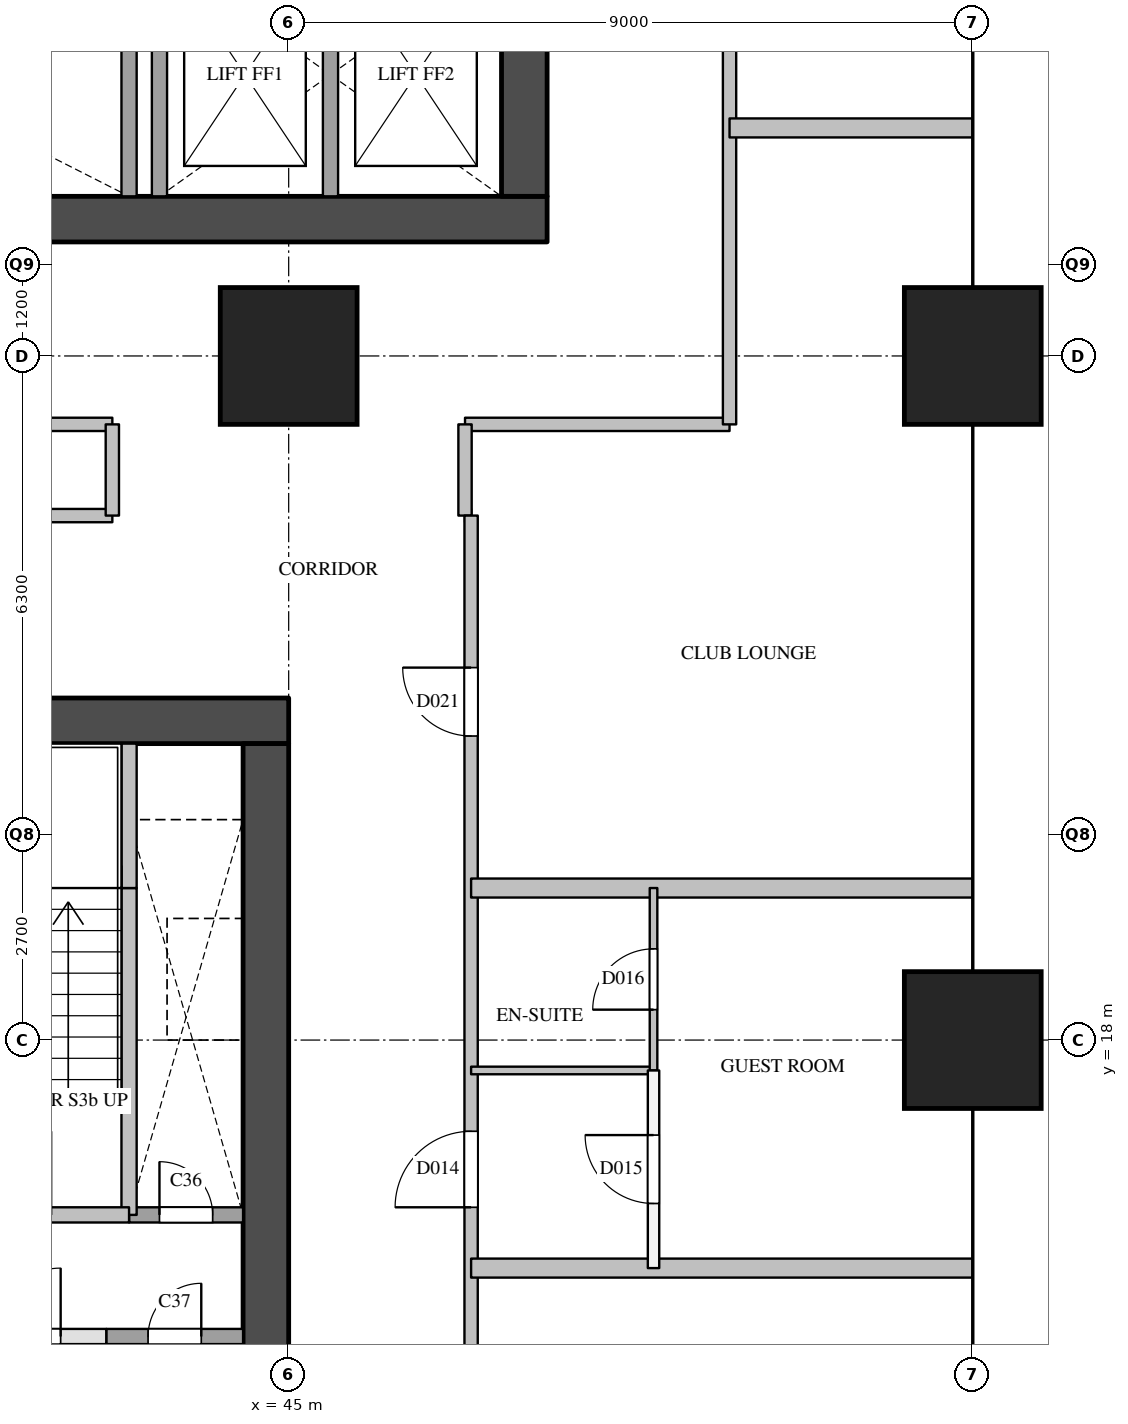
"""IFC4 building model, lengths in metres.
Left out: names, types, materials, properties, quantities, classifications, styles, units other than length and angle.
Written with IfcOpenShell. Run it as: python <this file> out.ifc"""

import sys

from ifc_helpers import new_model, si_unit, direction, frame, frame_2d, origin, origin_2d, place, context, subcontext, project, spatial, rectangle, extrude, element, fill, save


model = new_model("IFC4")
c1 = context("Model", 3, precision=1e-05, world=origin(), true_north=direction((0.0, 1.0)))
c2 = subcontext(c1, "Body", "Model", "MODEL_VIEW")
j1 = project(units=[si_unit("LENGTHUNIT", "METRE"), si_unit("PLANEANGLEUNIT", "RADIAN")], contexts=[c1])
p1 = place(None, origin())
s1 = spatial("IfcSite", under=j1, at=p1, CompositionType="ELEMENT")
p2 = place(p1, origin())
s2 = spatial("IfcBuilding", under=s1, at=p2, CompositionType="ELEMENT")
p3 = place(p2, frame((0.0, 0.0, 50.0)))
s3 = spatial("IfcBuildingStorey", under=s2, at=p3, CompositionType="ELEMENT", Elevation=50.0)
for number, where, z_axis, x_axis in (
    (1, (45.0, 27.0, 0.0), (0.0, 0.0, 1.0), (1.0, 0.0, 0.0)),
    (2, (54.0, 18.0, 0.0), (0.0, 0.0, 1.0), (1.0, 0.0, 0.0)),
    (3, (54.0, 27.0, 0.0), (0.0, 0.0, 1.0), (1.0, 0.0, 0.0)),
):
    element("IfcColumn", number, at=place(p3, frame(where, z_axis=z_axis, x_axis=x_axis)), inside=s3, PredefinedType="COLUMN", context=c2, shape_type="SweptSolid", body=[
        extrude(rectangle(XDim=1.8, YDim=1.8, at=origin_2d()), origin(), (0.0, 0.0, 1.0), 3.8),
    ])
p4 = place(p3, frame((36.0, 28.8, 0.0), z_axis=(0.0, 0.0, 1.0), x_axis=(1.0, 0.0, 0.0)))
e4 = element("IfcWall", 4, at=p4, inside=s3, PredefinedType="SHEAR", context=c2, shape_type="SweptSolid", body=[
    extrude(rectangle(XDim=12.4, YDim=0.6, at=frame_2d((6.2, 0.0))), origin(), (0.0, 0.0, 1.0), 3.5),
])
p5 = place(p3, frame((48.1, 29.1, 0.0), z_axis=(0.0, 0.0, 1.0), x_axis=(0.0, 1.0, 0.0)))
e5 = element("IfcWall", 5, at=p5, inside=s3, PredefinedType="SHEAR", context=c2, shape_type="SweptSolid", body=[
    extrude(rectangle(XDim=20.3, YDim=0.6, at=frame_2d((10.15, 0.0))), origin(), (0.0, 0.0, 1.0), 3.5),
])
p6 = place(p5, frame((12.5, 0.0, 0.0)))
e6 = element("IfcOpeningElement", 6, at=p6, cuts=e5, PredefinedType="OPENING", context=c2, shape_type="SweptSolid", body=[
    extrude(rectangle(XDim=0.7, YDim=2.1, at=frame_2d((0.35, 1.05))), frame((0.0, 0.31, 0.0), z_axis=(0.0, -1.0, 0.0), x_axis=(1.0, 0.0, 0.0)), (0.0, 0.0, 1.0), 0.62),
])
p7 = place(p5, frame((3.9, 0.0, 0.0)))
e7 = element("IfcOpeningElement", 7, at=p7, cuts=e5, PredefinedType="OPENING", context=c2, shape_type="SweptSolid", body=[
    extrude(rectangle(XDim=1.8, YDim=2.1, at=frame_2d((0.9, 1.05))), frame((0.0, 0.31, 0.0), z_axis=(0.0, -1.0, 0.0), x_axis=(1.0, 0.0, 0.0)), (0.0, 0.0, 1.0), 0.62),
])
p8 = place(p3, frame((42.9, 29.1, 0.0), z_axis=(0.0, 0.0, 1.0), x_axis=(0.0, 1.0, 0.0)))
e8 = element("IfcWall", 8, at=p8, inside=s3, PredefinedType="SOLIDWALL", context=c2, shape_type="SweptSolid", body=[
    extrude(rectangle(XDim=3.2, YDim=0.2, at=frame_2d((1.6, 0.0))), origin(), (0.0, 0.0, 1.0), 3.5),
])
p9 = place(p3, frame((43.3, 29.1, 0.0), z_axis=(0.0, 0.0, 1.0), x_axis=(0.0, 1.0, 0.0)))
e9 = element("IfcWall", 9, at=p9, inside=s3, PredefinedType="SOLIDWALL", context=c2, shape_type="SweptSolid", body=[
    extrude(rectangle(XDim=9.9, YDim=0.2, at=frame_2d((4.95, 0.0))), origin(), (0.0, 0.0, 1.0), 3.5),
])
p10 = place(p3, frame((45.55, 29.1, 0.0), z_axis=(0.0, 0.0, 1.0), x_axis=(0.0, 1.0, 0.0)))
e10 = element("IfcWall", 10, at=p10, inside=s3, PredefinedType="SOLIDWALL", context=c2, shape_type="SweptSolid", body=[
    extrude(rectangle(XDim=3.2, YDim=0.2, at=frame_2d((1.6, 0.0))), origin(), (0.0, 0.0, 1.0), 3.5),
])
p11 = place(p3, frame((36.0, 22.2, 0.0), z_axis=(0.0, 0.0, 1.0), x_axis=(1.0, 0.0, 0.0)))
e11 = element("IfcWall", 11, at=p11, inside=s3, PredefinedType="SHEAR", context=c2, shape_type="SweptSolid", body=[
    extrude(rectangle(XDim=9.0, YDim=0.6, at=frame_2d((4.5, 0.0))), origin(), (0.0, 0.0, 1.0), 3.5),
])
p12 = place(p3, frame((44.7, 9.6, 0.0), z_axis=(0.0, 0.0, 1.0), x_axis=(0.0, 1.0, 0.0)))
e12 = element("IfcWall", 12, at=p12, inside=s3, PredefinedType="SHEAR", context=c2, shape_type="SweptSolid", body=[
    extrude(rectangle(XDim=12.3, YDim=0.6, at=frame_2d((6.15, 0.0))), origin(), (0.0, 0.0, 1.0), 3.5),
])
p13 = place(p12, frame((0.8, 0.0, 0.0)))
e13 = element("IfcOpeningElement", 13, at=p13, cuts=e12, PredefinedType="OPENING", context=c2, shape_type="SweptSolid", body=[
    extrude(rectangle(XDim=0.7, YDim=2.1, at=frame_2d((0.35, 1.05))), frame((0.0, 0.31, 0.0), z_axis=(0.0, -1.0, 0.0), x_axis=(1.0, 0.0, 0.0)), (0.0, 0.0, 1.0), 0.62),
])
p14 = place(p3, frame((42.6, 11.9, 0.0), z_axis=(0.0, 0.0, 1.0), x_axis=(0.0, 1.0, 0.0)))
e14 = element("IfcWall", 14, at=p14, inside=s3, PredefinedType="SOLIDWALL", context=c2, shape_type="SweptSolid", body=[
    extrude(rectangle(XDim=2.2, YDim=0.2, at=frame_2d((1.1, 0.0))), origin(), (0.0, 0.0, 1.0), 3.5),
])
p15 = place(p3, frame((42.9, 15.7, 0.0), z_axis=(0.0, 0.0, 1.0), x_axis=(0.0, 1.0, 0.0)))
e15 = element("IfcWall", 15, at=p15, inside=s3, PredefinedType="SOLIDWALL", context=c2, shape_type="SweptSolid", body=[
    extrude(rectangle(XDim=4.3, YDim=0.2, at=frame_2d((2.15, 0.0))), origin(), (0.0, 0.0, 1.0), 3.5),
])
p16 = place(p3, frame((42.9, 20.0, 0.0), z_axis=(0.0, 0.0, 1.0), x_axis=(0.0, 1.0, 0.0)))
e16 = element("IfcWall", 16, at=p16, inside=s3, PredefinedType="SOLIDWALL", context=c2, shape_type="SweptSolid", body=[
    extrude(rectangle(XDim=1.9, YDim=0.2, at=frame_2d((0.95, 0.0))), origin(), (0.0, 0.0, 1.0), 3.5),
])
p17 = place(p3, frame((36.6, 14.1, 0.0), z_axis=(0.0, 0.0, 1.0), x_axis=(1.0, 0.0, 0.0)))
e17 = element("IfcWall", 17, at=p17, inside=s3, PredefinedType="PARTITIONING", context=c2, shape_type="SweptSolid", body=[
    extrude(rectangle(XDim=6.0, YDim=0.2, at=frame_2d((3.0, 0.0))), origin(), (0.0, 0.0, 1.0), 3.5),
])
p18 = place(p17, frame((1.5, 0.0, 0.0)))
e18 = element("IfcOpeningElement", 18, at=p18, cuts=e17, PredefinedType="OPENING", context=c2, shape_type="SweptSolid", body=[
    extrude(rectangle(XDim=0.9, YDim=2.1, at=frame_2d((0.45, 1.05))), frame((0.0, 0.11, 0.0), z_axis=(0.0, -1.0, 0.0), x_axis=(1.0, 0.0, 0.0)), (0.0, 0.0, 1.0), 0.22),
])
p19 = place(p17, frame((4.5, 0.0, 0.0)))
e19 = element("IfcOpeningElement", 19, at=p19, cuts=e17, PredefinedType="OPENING", context=c2, shape_type="SweptSolid", body=[
    extrude(rectangle(XDim=0.9, YDim=2.1, at=frame_2d((0.45, 1.05))), frame((0.0, 0.11, 0.0), z_axis=(0.0, -1.0, 0.0), x_axis=(1.0, 0.0, 0.0)), (0.0, 0.0, 1.0), 0.22),
])
p20 = place(p3, frame((42.6, 14.1, 0.0), z_axis=(0.0, 0.0, 1.0), x_axis=(1.0, 0.0, 0.0)))
e20 = element("IfcWall", 20, at=p20, inside=s3, PredefinedType="SOLIDWALL", context=c2, shape_type="SweptSolid", body=[
    extrude(rectangle(XDim=1.8, YDim=0.2, at=frame_2d((0.9, 0.0))), origin(), (0.0, 0.0, 1.0), 3.5),
])
p21 = place(p20, frame((0.55, 0.0, 0.0)))
e21 = element("IfcOpeningElement", 21, at=p21, cuts=e20, PredefinedType="OPENING", context=c2, shape_type="SweptSolid", body=[
    extrude(rectangle(XDim=0.7, YDim=2.1, at=frame_2d((0.35, 1.05))), frame((0.0, 0.11, 0.0), z_axis=(0.0, -1.0, 0.0), x_axis=(1.0, 0.0, 0.0)), (0.0, 0.0, 1.0), 0.22),
])
p22 = place(p3, frame((42.9, 15.7, 0.0), z_axis=(0.0, 0.0, 1.0), x_axis=(1.0, 0.0, 0.0)))
e22 = element("IfcWall", 22, at=p22, inside=s3, PredefinedType="SOLIDWALL", context=c2, shape_type="SweptSolid", body=[
    extrude(rectangle(XDim=1.5, YDim=0.2, at=frame_2d((0.75, 0.0))), origin(), (0.0, 0.0, 1.0), 3.5),
])
p23 = place(p22, frame((0.4, 0.0, 0.0)))
e23 = element("IfcOpeningElement", 23, at=p23, cuts=e22, PredefinedType="OPENING", context=c2, shape_type="SweptSolid", body=[
    extrude(rectangle(XDim=0.7, YDim=2.1, at=frame_2d((0.35, 1.05))), frame((0.0, 0.11, 0.0), z_axis=(0.0, -1.0, 0.0), x_axis=(1.0, 0.0, 0.0)), (0.0, 0.0, 1.0), 0.22),
])
p24 = place(p3, frame((36.6, 15.7, 0.0), z_axis=(0.0, 0.0, 1.0), x_axis=(1.0, 0.0, 0.0)))
e24 = element("IfcWall", 24, at=p24, inside=s3, PredefinedType="SOLIDWALL", context=c2, shape_type="SweptSolid", body=[
    extrude(rectangle(XDim=6.3, YDim=0.2, at=frame_2d((3.15, 0.0))), origin(), (0.0, 0.0, 1.0), 3.5),
])
p25 = place(p24, frame((1.025, 0.0, 0.0)))
e25 = element("IfcOpeningElement", 25, at=p25, cuts=e24, PredefinedType="OPENING", context=c2, shape_type="SweptSolid", body=[
    extrude(rectangle(XDim=1.1, YDim=2.1, at=frame_2d((0.55, 1.05))), frame((0.0, 0.11, 0.0), z_axis=(0.0, -1.0, 0.0), x_axis=(1.0, 0.0, 0.0)), (0.0, 0.0, 1.0), 0.22),
])
p26 = place(p24, frame((4.175, 0.0, 0.0)))
e26 = element("IfcOpeningElement", 26, at=p26, cuts=e24, PredefinedType="OPENING", context=c2, shape_type="SweptSolid", body=[
    extrude(rectangle(XDim=1.1, YDim=2.1, at=frame_2d((0.55, 1.05))), frame((0.0, 0.11, 0.0), z_axis=(0.0, -1.0, 0.0), x_axis=(1.0, 0.0, 0.0)), (0.0, 0.0, 1.0), 0.22),
])
p27 = place(p3, frame((38.32, 24.9, 0.0), z_axis=(0.0, 0.0, 1.0), x_axis=(1.0, 0.0, 0.0)))
e27 = element("IfcWall", 27, at=p27, inside=s3, PredefinedType="PARTITIONING", context=c2, shape_type="SweptSolid", body=[
    extrude(rectangle(XDim=4.36, YDim=0.175, at=frame_2d((2.18, 0.0))), origin(), (0.0, 0.0, 1.0), 3.5),
])
p28 = place(p27, frame((1.68, 0.0, 0.0)))
e28 = element("IfcOpeningElement", 28, at=p28, cuts=e27, PredefinedType="OPENING", context=c2, shape_type="SweptSolid", body=[
    extrude(rectangle(XDim=1.0, YDim=2.1, at=frame_2d((0.5, 1.05))), frame((0.0, 0.097, 0.0), z_axis=(0.0, -1.0, 0.0), x_axis=(1.0, 0.0, 0.0)), (0.0, 0.0, 1.0), 0.195),
])
p29 = place(p3, frame((47.32, 24.9, 0.0), z_axis=(0.0, 0.0, 1.0), x_axis=(1.0, 0.0, 0.0)))
e29 = element("IfcWall", 29, at=p29, inside=s3, PredefinedType="PARTITIONING", context=c2, shape_type="SweptSolid", body=[
    extrude(rectangle(XDim=0.08, YDim=0.175, at=frame_2d((0.04, 0.0))), origin(), (0.0, 0.0, 1.0), 3.5),
])
p30 = place(p3, frame((38.32, 26.1, 0.0), z_axis=(0.0, 0.0, 1.0), x_axis=(1.0, 0.0, 0.0)))
e30 = element("IfcWall", 30, at=p30, inside=s3, PredefinedType="PARTITIONING", context=c2, shape_type="SweptSolid", body=[
    extrude(rectangle(XDim=4.36, YDim=0.175, at=frame_2d((2.18, 0.0))), origin(), (0.0, 0.0, 1.0), 3.5),
])
p31 = place(p3, frame((47.32, 26.1, 0.0), z_axis=(0.0, 0.0, 1.0), x_axis=(1.0, 0.0, 0.0)))
e31 = element("IfcWall", 31, at=p31, inside=s3, PredefinedType="PARTITIONING", context=c2, shape_type="SweptSolid", body=[
    extrude(rectangle(XDim=3.48, YDim=0.175, at=frame_2d((1.74, 0.0))), origin(), (0.0, 0.0, 1.0), 3.5),
])
for number, where, z_axis, x_axis in (
    (32, (42.68, 24.9, 0.0), (0.0, 0.0, 1.0), (0.0, 1.0, 0.0)),
    (33, (47.32, 24.9, 0.0), (0.0, 0.0, 1.0), (0.0, 1.0, 0.0)),
):
    element("IfcWall", number, at=place(p3, frame(where, z_axis=z_axis, x_axis=x_axis)), inside=s3, PredefinedType="PARTITIONING", context=c2, shape_type="SweptSolid", body=[
        extrude(rectangle(XDim=1.2, YDim=0.175, at=frame_2d((0.6, 0.0))), origin(), (0.0, 0.0, 1.0), 3.5),
    ])
p32 = place(p3, frame((47.4, 6.6, 0.0), z_axis=(0.0, 0.0, 1.0), x_axis=(0.0, 1.0, 0.0)))
e34 = element("IfcWall", 34, at=p32, inside=s3, PredefinedType="PARTITIONING", context=c2, shape_type="SweptSolid", body=[
    extrude(rectangle(XDim=18.3, YDim=0.175, at=frame_2d((9.15, 0.0))), origin(), (0.0, 0.0, 1.0), 3.5),
])
p33 = place(p32, frame((3.75, 0.0, 0.0)))
e35 = element("IfcOpeningElement", 35, at=p33, cuts=e34, PredefinedType="OPENING", context=c2, shape_type="SweptSolid", body=[
    extrude(rectangle(XDim=0.9, YDim=2.1, at=frame_2d((0.45, 1.05))), frame((0.0, 0.097, 0.0), z_axis=(0.0, -1.0, 0.0), x_axis=(1.0, 0.0, 0.0)), (0.0, 0.0, 1.0), 0.195),
])
p34 = place(p32, frame((9.2, 0.0, 0.0)))
e36 = element("IfcOpeningElement", 36, at=p34, cuts=e34, PredefinedType="OPENING", context=c2, shape_type="SweptSolid", body=[
    extrude(rectangle(XDim=1.0, YDim=2.1, at=frame_2d((0.5, 1.05))), frame((0.0, 0.097, 0.0), z_axis=(0.0, -1.0, 0.0), x_axis=(1.0, 0.0, 0.0)), (0.0, 0.0, 1.0), 0.195),
])
p35 = place(p32, frame((15.4, 0.0, 0.0)))
e37 = element("IfcOpeningElement", 37, at=p35, cuts=e34, PredefinedType="OPENING", context=c2, shape_type="SweptSolid", body=[
    extrude(rectangle(XDim=0.9, YDim=2.1, at=frame_2d((0.45, 1.05))), frame((0.0, 0.097, 0.0), z_axis=(0.0, -1.0, 0.0), x_axis=(1.0, 0.0, 0.0)), (0.0, 0.0, 1.0), 0.195),
])
p36 = place(p3, frame((50.8, 26.1, 0.0), z_axis=(0.0, 0.0, 1.0), x_axis=(0.0, 1.0, 0.0)))
e38 = element("IfcWall", 38, at=p36, inside=s3, PredefinedType="PARTITIONING", context=c2, shape_type="SweptSolid", body=[
    extrude(rectangle(XDim=26.3, YDim=0.175, at=frame_2d((13.15, 0.0))), origin(), (0.0, 0.0, 1.0), 2.5),
])
p37 = place(p36, frame((5.95, 0.0, 0.0)))
e39 = element("IfcOpeningElement", 39, at=p37, cuts=e38, PredefinedType="OPENING", context=c2, shape_type="SweptSolid", body=[
    extrude(rectangle(XDim=0.9, YDim=2.1, at=frame_2d((0.45, 1.05))), frame((0.0, 0.097, 0.0), z_axis=(0.0, -1.0, 0.0), x_axis=(1.0, 0.0, 0.0)), (0.0, 0.0, 1.0), 0.195),
])
p38 = place(p36, frame((13.4, 0.0, 0.0)))
e40 = element("IfcOpeningElement", 40, at=p38, cuts=e38, PredefinedType="OPENING", context=c2, shape_type="SweptSolid", body=[
    extrude(rectangle(XDim=1.0, YDim=2.1, at=frame_2d((0.5, 1.05))), frame((0.0, 0.097, 0.0), z_axis=(0.0, -1.0, 0.0), x_axis=(1.0, 0.0, 0.0)), (0.0, 0.0, 1.0), 0.195),
])
p39 = place(p36, frame((22.15, 0.0, 0.0)))
e41 = element("IfcOpeningElement", 41, at=p39, cuts=e38, PredefinedType="OPENING", context=c2, shape_type="SweptSolid", body=[
    extrude(rectangle(XDim=0.9, YDim=2.1, at=frame_2d((0.45, 1.05))), frame((0.0, 0.097, 0.0), z_axis=(0.0, -1.0, 0.0), x_axis=(1.0, 0.0, 0.0)), (0.0, 0.0, 1.0), 0.195),
])
p40 = place(p3, frame((49.8, 15.0, 0.0), z_axis=(0.0, 0.0, 1.0), x_axis=(0.0, 1.0, 0.0)))
e42 = element("IfcWall", 42, at=p40, inside=s3, PredefinedType="PARTITIONING", context=c2, shape_type="SweptSolid", body=[
    extrude(rectangle(XDim=2.6, YDim=0.15, at=frame_2d((1.3, 0.0))), origin(), (0.0, 0.0, 1.0), 3.5),
])
p41 = place(p40, frame((0.85, 0.0, 0.0)))
e43 = element("IfcOpeningElement", 43, at=p41, cuts=e42, PredefinedType="OPENING", context=c2, shape_type="SweptSolid", body=[
    extrude(rectangle(XDim=0.9, YDim=2.1, at=frame_2d((0.45, 1.05))), frame((0.0, 0.085, 0.0), z_axis=(0.0, -1.0, 0.0), x_axis=(1.0, 0.0, 0.0)), (0.0, 0.0, 1.0), 0.17),
])
for number, where, z_axis, x_axis in (
    (44, (47.4, 15.0, 0.0), (0.0, 0.0, 1.0), (1.0, 0.0, 0.0)),
    (45, (47.4, 20.0, 0.0), (0.0, 0.0, 1.0), (1.0, 0.0, 0.0)),
):
    element("IfcWall", number, at=place(p3, frame(where, z_axis=z_axis, x_axis=x_axis)), inside=s3, PredefinedType="PARTITIONING", context=c2, shape_type="SweptSolid", body=[
        extrude(rectangle(XDim=6.6, YDim=0.25, at=frame_2d((3.3, 0.0))), origin(), (0.0, 0.0, 1.0), 2.5),
    ])
p42 = place(p3, frame((50.8, 30.0, 0.0), z_axis=(0.0, 0.0, 1.0), x_axis=(1.0, 0.0, 0.0)))
e46 = element("IfcWall", 46, at=p42, inside=s3, PredefinedType="PARTITIONING", context=c2, shape_type="SweptSolid", body=[
    extrude(rectangle(XDim=3.2, YDim=0.25, at=frame_2d((1.6, 0.0))), origin(), (0.0, 0.0, 1.0), 2.5),
])
p43 = place(p3, frame((47.4, 17.6, 0.0), z_axis=(0.0, 0.0, 1.0), x_axis=(1.0, 0.0, 0.0)))
e47 = element("IfcWall", 47, at=p43, inside=s3, PredefinedType="PARTITIONING", context=c2, shape_type="SweptSolid", body=[
    extrude(rectangle(XDim=2.4, YDim=0.1, at=frame_2d((1.2, 0.0))), origin(), (0.0, 0.0, 1.0), 3.5),
])
p44 = place(p3, frame((49.8, 17.6, 0.0), z_axis=(0.0, 0.0, 1.0), x_axis=(0.0, 1.0, 0.0)))
e48 = element("IfcWall", 48, at=p44, inside=s3, PredefinedType="PARTITIONING", context=c2, shape_type="SweptSolid", body=[
    extrude(rectangle(XDim=2.4, YDim=0.1, at=frame_2d((1.2, 0.0))), origin(), (0.0, 0.0, 1.0), 3.5),
])
p45 = place(p44, frame((0.8, 0.0, 0.0)))
e49 = element("IfcOpeningElement", 49, at=p45, cuts=e48, PredefinedType="OPENING", context=c2, shape_type="SweptSolid", body=[
    extrude(rectangle(XDim=0.8, YDim=2.1, at=frame_2d((0.4, 1.05))), frame((0.0, 0.06, 0.0), z_axis=(0.0, -1.0, 0.0), x_axis=(1.0, 0.0, 0.0)), (0.0, 0.0, 1.0), 0.12),
])
p46 = place(p23, origin())
e50 = element("IfcDoor", 50, at=p46, inside=s3, OperationType="SINGLE_SWING_LEFT", PredefinedType="DOOR", context=c2, shape_type="SweptSolid", body=[
    extrude(rectangle(XDim=0.7, YDim=2.1, at=frame_2d((0.35, 1.05))), frame((0.0, 0.025, 0.0), z_axis=(0.0, -1.0, 0.0), x_axis=(1.0, 0.0, 0.0)), (0.0, 0.0, 1.0), 0.05),
])
fill(e23, e50)
p47 = place(p21, origin())
e51 = element("IfcDoor", 51, at=p47, inside=s3, OperationType="SINGLE_SWING_RIGHT", PredefinedType="DOOR", context=c2, shape_type="SweptSolid", body=[
    extrude(rectangle(XDim=0.7, YDim=2.1, at=frame_2d((0.35, 1.05))), frame((0.0, 0.025, 0.0), z_axis=(0.0, -1.0, 0.0), x_axis=(1.0, 0.0, 0.0)), (0.0, 0.0, 1.0), 0.05),
])
fill(e21, e51)
p48 = place(p19, origin())
e52 = element("IfcDoor", 52, at=p48, inside=s3, OperationType="SINGLE_SWING_RIGHT", PredefinedType="DOOR", context=c2, shape_type="SweptSolid", body=[
    extrude(rectangle(XDim=0.9, YDim=2.1, at=frame_2d((0.45, 1.05))), frame((0.0, 0.025, 0.0), z_axis=(0.0, -1.0, 0.0), x_axis=(1.0, 0.0, 0.0)), (0.0, 0.0, 1.0), 0.05),
])
fill(e19, e52)
p49 = place(p34, origin())
e53 = element("IfcDoor", 53, at=p49, inside=s3, OperationType="SINGLE_SWING_LEFT", PredefinedType="DOOR", context=c2, shape_type="SweptSolid", body=[
    extrude(rectangle(XDim=1.0, YDim=2.1, at=frame_2d((0.5, 1.05))), frame((0.0, 0.025, 0.0), z_axis=(0.0, -1.0, 0.0), x_axis=(1.0, 0.0, 0.0)), (0.0, 0.0, 1.0), 0.05),
])
fill(e36, e53)
p50 = place(p41, origin())
e54 = element("IfcDoor", 54, at=p50, inside=s3, OperationType="SINGLE_SWING_RIGHT", PredefinedType="DOOR", context=c2, shape_type="SweptSolid", body=[
    extrude(rectangle(XDim=0.9, YDim=2.1, at=frame_2d((0.45, 1.05))), frame((0.0, 0.025, 0.0), z_axis=(0.0, -1.0, 0.0), x_axis=(1.0, 0.0, 0.0)), (0.0, 0.0, 1.0), 0.05),
])
fill(e43, e54)
p51 = place(p45, origin())
e55 = element("IfcDoor", 55, at=p51, inside=s3, OperationType="SINGLE_SWING_LEFT", PredefinedType="DOOR", context=c2, shape_type="SweptSolid", body=[
    extrude(rectangle(XDim=0.8, YDim=2.1, at=frame_2d((0.4, 1.05))), frame((0.0, 0.025, 0.0), z_axis=(0.0, -1.0, 0.0), x_axis=(1.0, 0.0, 0.0)), (0.0, 0.0, 1.0), 0.05),
])
fill(e49, e55)
p52 = place(p35, origin())
e56 = element("IfcDoor", 56, at=p52, inside=s3, OperationType="SINGLE_SWING_RIGHT", PredefinedType="DOOR", context=c2, shape_type="SweptSolid", body=[
    extrude(rectangle(XDim=0.9, YDim=2.1, at=frame_2d((0.45, 1.05))), frame((0.0, 0.025, 0.0), z_axis=(0.0, -1.0, 0.0), x_axis=(1.0, 0.0, 0.0)), (0.0, 0.0, 1.0), 0.05),
])
fill(e37, e56)
save(model, sys.argv[1])
